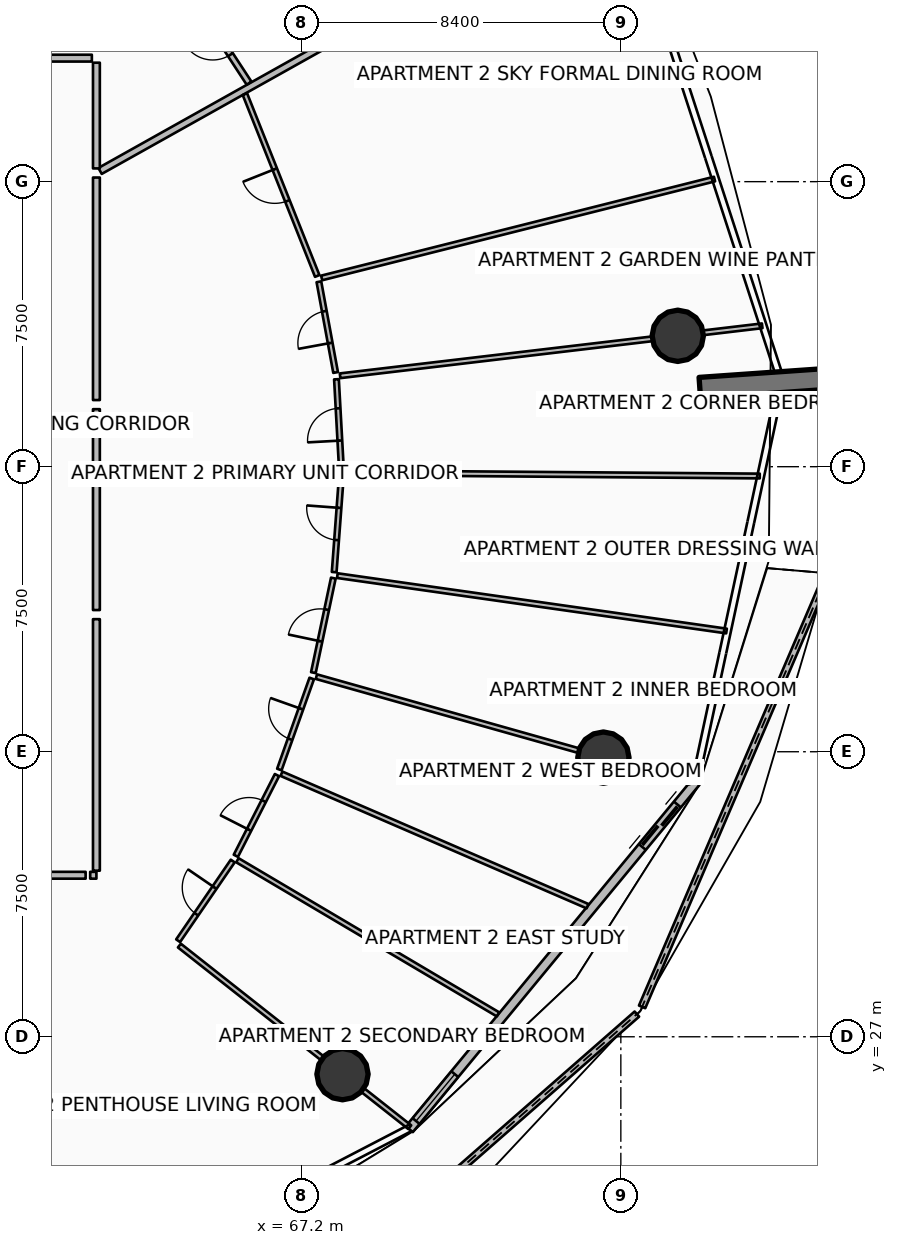
"""IFC4 building model, lengths in metres.
Left out: names, types, materials, properties, quantities, classifications, styles, units other than length and angle.
Written with IfcOpenShell. Run it as: python <this file> out.ifc"""

import sys

from ifc_helpers import new_model, si_unit, direction, frame, frame_2d, origin, origin_2d, place, context, subcontext, project, spatial, polyline, rectangle, circle, outline, extrude, element, fill, save


model = new_model("IFC4")
c1 = context("Model", 3, precision=1e-05, world=origin(), true_north=direction((0.0, 1.0)))
c2 = subcontext(c1, "Body", "Model", "MODEL_VIEW")
j1 = project(units=[si_unit("LENGTHUNIT", "METRE"), si_unit("PLANEANGLEUNIT", "RADIAN")], contexts=[c1])
p1 = place(None, origin())
s1 = spatial("IfcSite", under=j1, at=p1, CompositionType="ELEMENT")
p2 = place(p1, origin())
s2 = spatial("IfcBuilding", under=s1, at=p2, CompositionType="ELEMENT")
p3 = place(p2, frame((0.0, 0.0, 71.4)))
s3 = spatial("IfcBuildingStorey", under=s2, at=p3, CompositionType="ELEMENT", Elevation=71.4)
p4 = place(p3, frame((77.678, 44.075, 0.0), z_axis=(0.0, 0.0, 1.0), x_axis=(0.997564163539, 0.069754853754, 0.0)))
e1 = element("IfcWall", 1, at=p4, inside=s3, PredefinedType="SOLIDWALL", context=c2, shape_type="SweptSolid", body=[
    extrude(rectangle(XDim=3.5, YDim=0.55, at=frame_2d((1.75, 0.0))), origin(), (0.0, 0.0, 1.0), 3.75),
])
p5 = place(p3, frame((68.276, 26.016, 0.0), z_axis=(-0.320814220059, 0.252899785334, 0.912754038493), x_axis=(-0.619079225089, -0.785328538297, 0.0)))
e2 = element("IfcColumn", 2, at=p5, inside=s3, PredefinedType="COLUMN", context=c2, shape_type="SweptSolid", body=[
    extrude(circle(Radius=0.675, at=origin_2d()), origin(), (0.0, 0.0, 1.0), 3.67),
])
p6 = place(p3, frame((75.141, 34.345, 0.0), z_axis=(-0.422633852071, 0.119162449383, 0.898432489251), x_axis=(-0.271371626932, -0.962474643872, 0.0)))
e3 = element("IfcColumn", 3, at=p6, inside=s3, PredefinedType="COLUMN", context=c2, shape_type="SweptSolid", body=[
    extrude(circle(Radius=0.675, at=origin_2d()), origin(), (0.0, 0.0, 1.0), 3.729),
])
p7 = place(p3, frame((77.098, 45.444, 0.0), z_axis=(-0.449694478252, -0.053279796585, 0.8915919131), x_axis=(0.117657060398, -0.993054286602, 0.0)))
e4 = element("IfcColumn", 4, at=p7, inside=s3, PredefinedType="COLUMN", context=c2, shape_type="SweptSolid", body=[
    extrude(circle(Radius=0.675, at=origin_2d()), origin(), (0.0, 0.0, 1.0), 3.757),
])
p8 = place(p3, frame((67.163, 19.839, 0.0), z_axis=(0.0, 0.0, 1.0), x_axis=(0.752310783683, 0.658808382426, 0.0)))
e5 = element("IfcWall", 5, at=p8, inside=s3, PredefinedType="PARAPET", context=c2, shape_type="SweptSolid", body=[
    extrude(outline(polyline([(0.0, 0.0), (11.776, 0.0), (11.776, 1.348), (5.888, 1.562), (0.0, 1.747), (0.0, 0.0)])), frame((0.0, 0.09, 0.0), z_axis=(0.0, -1.0, 0.0), x_axis=(1.0, 0.0, 0.0)), (0.0, 0.0, 1.0), 0.18),
])
p9 = place(p3, frame((76.159, 27.786, 0.0), z_axis=(0.0, 0.0, 1.0), x_axis=(0.393762615554, 0.919212164079, 0.0)))
e6 = element("IfcWall", 6, at=p9, inside=s3, PredefinedType="PARAPET", context=c2, shape_type="SweptSolid", body=[
    extrude(outline(polyline([(0.0, 0.0), (12.412, 0.0), (12.412, 1.12), (6.206, 1.182), (0.0, 1.348), (0.0, 0.0)])), frame((0.0, 0.09, 0.0), z_axis=(0.0, -1.0, 0.0), x_axis=(1.0, 0.0, 0.0)), (0.0, 0.0, 1.0), 0.18),
])
p10 = place(p3, frame((70.033, 24.567, 0.0), z_axis=(0.0, 0.0, 1.0), x_axis=(0.636674332663, 0.771132799281, 0.0)))
e7 = element("IfcWall", 7, at=p10, inside=s3, PredefinedType="SOLIDWALL", context=c2, shape_type="SweptSolid", body=[
    extrude(rectangle(XDim=11.851, YDim=0.24, at=frame_2d((5.926, 0.0))), origin(), (0.0, 0.0, 1.0), 2.3),
])
p11 = place(p10, frame((9.631, 0.0, 0.0)))
e8 = element("IfcOpeningElement", 8, at=p11, cuts=e7, PredefinedType="OPENING", context=c2, shape_type="SweptSolid", body=[
    extrude(rectangle(XDim=1.45, YDim=2.15, at=frame_2d((0.725, 1.075))), frame((0.0, 0.13, 0.0), z_axis=(0.0, -1.0, 0.0), x_axis=(1.0, 0.0, 0.0)), (0.0, 0.0, 1.0), 0.26),
])
p12 = place(p10, frame((0.28, 0.0, 0.65)))
e9 = element("IfcOpeningElement", 9, at=p12, cuts=e7, PredefinedType="OPENING", context=c2, shape_type="SweptSolid", body=[
    extrude(rectangle(XDim=1.6, YDim=1.5, at=frame_2d((0.8, 0.75))), frame((0.0, 0.13, 0.0), z_axis=(0.0, -1.0, 0.0), x_axis=(1.0, 0.0, 0.0)), (0.0, 0.0, 1.0), 0.26),
])
p13 = place(p3, frame((61.896, 49.782, 0.0), z_axis=(0.0, 0.0, 1.0), x_axis=(0.872493215695, 0.488626225828, 0.0)))
e10 = element("IfcWall", 10, at=p13, inside=s3, PredefinedType="PARTITIONING", context=c2, shape_type="SweptSolid", body=[
    extrude(rectangle(XDim=15.612, YDim=0.18, at=frame_2d((7.806, 0.0))), origin(), (0.0, 0.0, 1.0), 2.307),
])
p14 = place(p3, frame((61.8, 49.848, 0.0), z_axis=(0.0, 0.0, 1.0), x_axis=(0.0, 1.0, 0.0)))
e11 = element("IfcWall", 11, at=p14, inside=s3, PredefinedType="PARTITIONING", context=c2, shape_type="SweptSolid", body=[
    extrude(rectangle(XDim=2.781, YDim=0.18, at=frame_2d((1.391, 0.0))), origin(), (0.0, 0.0, 1.0), 2.307),
])
p15 = place(p3, frame((61.68, 52.75, 0.0), z_axis=(0.0, 0.0, 1.0), x_axis=(-1.0, 0.0, 0.0)))
e12 = element("IfcWall", 12, at=p15, inside=s3, PredefinedType="PARTITIONING", context=c2, shape_type="SweptSolid", body=[
    extrude(rectangle(XDim=5.085, YDim=0.18, at=frame_2d((2.543, 0.0))), origin(), (0.0, 0.0, 1.0), 2.307),
])
p16 = place(p3, frame((65.816, 52.092, 0.0), z_axis=(0.0, 0.0, 1.0), x_axis=(-0.547635625156, 0.836716930664, 0.0)))
e13 = element("IfcWall", 13, at=p16, inside=s3, PredefinedType="PARTITIONING", context=c2, shape_type="SweptSolid", body=[
    extrude(rectangle(XDim=2.639, YDim=0.15, at=frame_2d((1.32, 0.0))), origin(), (0.0, 0.0, 1.0), 2.307),
])
p17 = place(p16, frame((0.895, 0.0, 0.0)))
e14 = element("IfcOpeningElement", 14, at=p17, cuts=e13, PredefinedType="OPENING", context=c2, shape_type="SweptSolid", body=[
    extrude(rectangle(XDim=0.85, YDim=2.06, at=frame_2d((0.425, 1.03))), frame((0.0, 0.085, 0.0), z_axis=(0.0, -1.0, 0.0), x_axis=(1.0, 0.0, 0.0)), (0.0, 0.0, 1.0), 0.17),
])
p18 = place(p3, frame((54.14, 31.25, 0.0), z_axis=(0.0, 0.0, 1.0), x_axis=(1.0, 0.0, 0.0)))
e15 = element("IfcWall", 15, at=p18, inside=s3, PredefinedType="PARTITIONING", context=c2, shape_type="SweptSolid", body=[
    extrude(rectangle(XDim=7.376, YDim=0.18, at=frame_2d((3.688, 0.0))), origin(), (0.0, 0.0, 1.0), 2.307),
])
p19 = place(p18, frame((3.138, 0.0, 0.0)))
e16 = element("IfcOpeningElement", 16, at=p19, cuts=e15, PredefinedType="OPENING", context=c2, shape_type="SweptSolid", body=[
    extrude(rectangle(XDim=1.1, YDim=2.1, at=frame_2d((0.55, 1.05))), frame((0.0, 0.1, 0.0), z_axis=(0.0, -1.0, 0.0), x_axis=(1.0, 0.0, 0.0)), (0.0, 0.0, 1.0), 0.2),
])
p20 = place(p3, frame((61.636, 31.25, 0.0), z_axis=(0.0, 0.0, 1.0), x_axis=(1.0, 0.0, 0.0)))
e17 = element("IfcWall", 17, at=p20, inside=s3, PredefinedType="PARTITIONING", context=c2, shape_type="SweptSolid", body=[
    extrude(rectangle(XDim=0.164, YDim=0.18, at=frame_2d((0.082, 0.0))), origin(), (0.0, 0.0, 1.0), 2.307),
])
p21 = place(p3, frame((61.8, 31.37, 0.0), z_axis=(0.0, 0.0, 1.0), x_axis=(0.0, 1.0, 0.0)))
e18 = element("IfcWall", 18, at=p21, inside=s3, PredefinedType="PARTITIONING", context=c2, shape_type="SweptSolid", body=[
    extrude(rectangle(XDim=6.618, YDim=0.18, at=frame_2d((3.309, 0.0))), origin(), (0.0, 0.0, 1.0), 2.307),
])
p22 = place(p3, frame((63.983, 29.4, 0.0), z_axis=(0.0, 0.0, 1.0), x_axis=(0.785322984339, -0.619086270457, 0.0)))
e19 = element("IfcWall", 19, at=p22, inside=s3, PredefinedType="PARTITIONING", context=c2, shape_type="SweptSolid", body=[
    extrude(rectangle(XDim=7.719, YDim=0.125, at=frame_2d((3.86, 0.0))), origin(), (0.0, 0.0, 1.0), 2.307),
])
p23 = place(p3, frame((65.51, 31.645, 0.0), z_axis=(0.0, 0.0, 1.0), x_axis=(0.86074163886, -0.509042072065, 0.0)))
e20 = element("IfcWall", 20, at=p23, inside=s3, PredefinedType="PARTITIONING", context=c2, shape_type="SweptSolid", body=[
    extrude(rectangle(XDim=7.968, YDim=0.125, at=frame_2d((3.984, 0.0))), origin(), (0.0, 0.0, 1.0), 2.325),
])
p24 = place(p3, frame((66.67, 33.921, 0.0), z_axis=(0.0, 0.0, 1.0), x_axis=(0.917747697885, -0.397163899451, 0.0)))
e21 = element("IfcWall", 21, at=p24, inside=s3, PredefinedType="PARTITIONING", context=c2, shape_type="SweptSolid", body=[
    extrude(rectangle(XDim=8.775, YDim=0.125, at=frame_2d((4.387, 0.0))), origin(), (0.0, 0.0, 1.0), 2.325),
])
p25 = place(p3, frame((63.95, 29.528, 0.0), z_axis=(0.0, 0.0, 1.0), x_axis=(0.565358509176, 0.824845292223, 0.0)))
e22 = element("IfcWall", 22, at=p25, inside=s3, PredefinedType="PARTITIONING", context=c2, shape_type="SweptSolid", body=[
    extrude(rectangle(XDim=2.542, YDim=0.125, at=frame_2d((1.271, 0.0))), origin(), (0.0, 0.0, 1.0), 2.307),
])
p26 = place(p25, frame((0.846, 0.0, 0.0)))
e23 = element("IfcOpeningElement", 23, at=p26, cuts=e22, PredefinedType="OPENING", context=c2, shape_type="SweptSolid", body=[
    extrude(rectangle(XDim=0.85, YDim=2.06, at=frame_2d((0.425, 1.03))), frame((0.0, 0.073, 0.0), z_axis=(0.0, -1.0, 0.0), x_axis=(1.0, 0.0, 0.0)), (0.0, 0.0, 1.0), 0.145),
])
p27 = place(p3, frame((65.469, 31.762, 0.0), z_axis=(0.0, 0.0, 1.0), x_axis=(0.45400250644, 0.891000406367, 0.0)))
e24 = element("IfcWall", 24, at=p27, inside=s3, PredefinedType="PARTITIONING", context=c2, shape_type="SweptSolid", body=[
    extrude(rectangle(XDim=2.383, YDim=0.125, at=frame_2d((1.192, 0.0))), origin(), (0.0, 0.0, 1.0), 2.79),
])
p28 = place(p27, frame((0.767, 0.0, 0.0)))
e25 = element("IfcOpeningElement", 25, at=p28, cuts=e24, PredefinedType="OPENING", context=c2, shape_type="SweptSolid", body=[
    extrude(rectangle(XDim=0.85, YDim=2.06, at=frame_2d((0.425, 1.03))), frame((0.0, 0.073, 0.0), z_axis=(0.0, -1.0, 0.0), x_axis=(1.0, 0.0, 0.0)), (0.0, 0.0, 1.0), 0.145),
])
p29 = place(p3, frame((66.614, 34.032, 0.0), z_axis=(0.0, 0.0, 1.0), x_axis=(0.335094930465, 0.942184370268, 0.0)))
e26 = element("IfcWall", 26, at=p29, inside=s3, PredefinedType="PARTITIONING", context=c2, shape_type="SweptSolid", body=[
    extrude(rectangle(XDim=2.542, YDim=0.125, at=frame_2d((1.271, 0.0))), origin(), (0.0, 0.0, 1.0), 2.307),
])
p30 = place(p29, frame((0.846, 0.0, 0.0)))
e27 = element("IfcOpeningElement", 27, at=p30, cuts=e26, PredefinedType="OPENING", context=c2, shape_type="SweptSolid", body=[
    extrude(rectangle(XDim=0.85, YDim=2.06, at=frame_2d((0.425, 1.03))), frame((0.0, 0.073, 0.0), z_axis=(0.0, -1.0, 0.0), x_axis=(1.0, 0.0, 0.0)), (0.0, 0.0, 1.0), 0.145),
])
p31 = place(p3, frame((61.8, 38.228, 0.0), z_axis=(0.0, 0.0, 1.0), x_axis=(0.0, 1.0, 0.0)))
e28 = element("IfcWall", 28, at=p31, inside=s3, PredefinedType="PARTITIONING", context=c2, shape_type="SweptSolid", body=[
    extrude(rectangle(XDim=5.285, YDim=0.18, at=frame_2d((2.643, 0.0))), origin(), (0.0, 0.0, 1.0), 2.307),
])
p32 = place(p3, frame((67.589, 36.475, 0.0), z_axis=(0.0, 0.0, 1.0), x_axis=(0.962457516126, -0.271432366627, 0.0)))
e29 = element("IfcWall", 29, at=p32, inside=s3, PredefinedType="PARTITIONING", context=c2, shape_type="SweptSolid", body=[
    extrude(rectangle(XDim=10.221, YDim=0.125, at=frame_2d((5.111, 0.0))), origin(), (0.0, 0.0, 1.0), 2.307),
])
p33 = place(p3, frame((68.14, 39.134, 0.0), z_axis=(0.0, 0.0, 1.0), x_axis=(0.990026759408, -0.140879436596, 0.0)))
e30 = element("IfcWall", 30, at=p33, inside=s3, PredefinedType="PARTITIONING", context=c2, shape_type="SweptSolid", body=[
    extrude(rectangle(XDim=10.344, YDim=0.125, at=frame_2d((5.172, 0.0))), origin(), (0.0, 0.0, 1.0), 2.325),
])
p34 = place(p3, frame((68.342, 41.84, 0.0), z_axis=(0.0, 0.0, 1.0), x_axis=(0.999969173113, -0.007851931271, 0.0)))
e31 = element("IfcWall", 31, at=p34, inside=s3, PredefinedType="PARTITIONING", context=c2, shape_type="SweptSolid", body=[
    extrude(rectangle(XDim=10.914, YDim=0.125, at=frame_2d((5.457, 0.0))), origin(), (0.0, 0.0, 1.0), 2.325),
])
p35 = place(p3, frame((67.509, 36.581, 0.0), z_axis=(0.0, 0.0, 1.0), x_axis=(0.206668673341, 0.978410986988, 0.0)))
e32 = element("IfcWall", 32, at=p35, inside=s3, PredefinedType="PARTITIONING", context=c2, shape_type="SweptSolid", body=[
    extrude(rectangle(XDim=2.542, YDim=0.125, at=frame_2d((1.271, 0.0))), origin(), (0.0, 0.0, 1.0), 2.307),
])
p36 = place(p35, frame((0.846, 0.0, 0.0)))
e33 = element("IfcOpeningElement", 33, at=p36, cuts=e32, PredefinedType="OPENING", context=c2, shape_type="SweptSolid", body=[
    extrude(rectangle(XDim=0.85, YDim=2.06, at=frame_2d((0.425, 1.03))), frame((0.0, 0.073, 0.0), z_axis=(0.0, -1.0, 0.0), x_axis=(1.0, 0.0, 0.0)), (0.0, 0.0, 1.0), 0.145),
])
p37 = place(p3, frame((68.057, 39.226, 0.0), z_axis=(0.0, 0.0, 1.0), x_axis=(0.074529691315, 0.997218795006, 0.0)))
e34 = element("IfcWall", 34, at=p37, inside=s3, PredefinedType="PARTITIONING", context=c2, shape_type="SweptSolid", body=[
    extrude(rectangle(XDim=2.542, YDim=0.125, at=frame_2d((1.271, 0.0))), origin(), (0.0, 0.0, 1.0), 2.79),
])
p38 = place(p37, frame((0.846, 0.0, 0.0)))
e35 = element("IfcOpeningElement", 35, at=p38, cuts=e34, PredefinedType="OPENING", context=c2, shape_type="SweptSolid", body=[
    extrude(rectangle(XDim=0.85, YDim=2.06, at=frame_2d((0.425, 1.03))), frame((0.0, 0.073, 0.0), z_axis=(0.0, -1.0, 0.0), x_axis=(1.0, 0.0, 0.0)), (0.0, 0.0, 1.0), 0.145),
])
p39 = place(p3, frame((68.248, 41.921, 0.0), z_axis=(0.0, 0.0, 1.0), x_axis=(-0.055010450721, 0.998485778723, 0.0)))
e36 = element("IfcWall", 36, at=p39, inside=s3, PredefinedType="PARTITIONING", context=c2, shape_type="SweptSolid", body=[
    extrude(rectangle(XDim=2.383, YDim=0.125, at=frame_2d((1.192, 0.0))), origin(), (0.0, 0.0, 1.0), 2.307),
])
p40 = place(p39, frame((0.767, 0.0, 0.0)))
e37 = element("IfcOpeningElement", 37, at=p40, cuts=e36, PredefinedType="OPENING", context=c2, shape_type="SweptSolid", body=[
    extrude(rectangle(XDim=0.85, YDim=2.06, at=frame_2d((0.425, 1.03))), frame((0.0, 0.073, 0.0), z_axis=(0.0, -1.0, 0.0), x_axis=(1.0, 0.0, 0.0)), (0.0, 0.0, 1.0), 0.145),
])
p41 = place(p3, frame((61.8, 43.753, 0.0), z_axis=(0.0, 0.0, 1.0), x_axis=(0.0, 1.0, 0.0)))
e38 = element("IfcWall", 38, at=p41, inside=s3, PredefinedType="PARTITIONING", context=c2, shape_type="SweptSolid", body=[
    extrude(rectangle(XDim=5.855, YDim=0.18, at=frame_2d((2.927, 0.0))), origin(), (0.0, 0.0, 1.0), 2.307),
])
p42 = place(p3, frame((68.212, 44.392, 0.0), z_axis=(0.0, 0.0, 1.0), x_axis=(0.993068868454, 0.117533920671, 0.0)))
e39 = element("IfcWall", 39, at=p42, inside=s3, PredefinedType="PARTITIONING", context=c2, shape_type="SweptSolid", body=[
    extrude(rectangle(XDim=11.186, YDim=0.125, at=frame_2d((5.593, 0.0))), origin(), (0.0, 0.0, 1.0), 2.307),
])
p43 = place(p3, frame((67.728, 46.966, 0.0), z_axis=(0.0, 0.0, 1.0), x_axis=(0.969745124893, 0.24411962794, 0.0)))
e40 = element("IfcWall", 40, at=p43, inside=s3, PredefinedType="PARTITIONING", context=c2, shape_type="SweptSolid", body=[
    extrude(rectangle(XDim=10.66, YDim=0.125, at=frame_2d((5.33, 0.0))), origin(), (0.0, 0.0, 1.0), 2.325),
])
p44 = place(p3, frame((68.094, 44.479, 0.0), z_axis=(0.0, 0.0, 1.0), x_axis=(-0.18117779211, 0.983450358506, 0.0)))
e41 = element("IfcWall", 41, at=p44, inside=s3, PredefinedType="PARTITIONING", context=c2, shape_type="SweptSolid", body=[
    extrude(rectangle(XDim=2.427, YDim=0.125, at=frame_2d((1.213, 0.0))), origin(), (0.0, 0.0, 1.0), 2.307),
])
p45 = place(p44, frame((0.788, 0.0, 0.0)))
e42 = element("IfcOpeningElement", 42, at=p45, cuts=e41, PredefinedType="OPENING", context=c2, shape_type="SweptSolid", body=[
    extrude(rectangle(XDim=0.85, YDim=2.06, at=frame_2d((0.425, 1.03))), frame((0.0, 0.073, 0.0), z_axis=(0.0, -1.0, 0.0), x_axis=(1.0, 0.0, 0.0)), (0.0, 0.0, 1.0), 0.145),
])
p46 = place(p3, frame((67.611, 47.019, 0.0), z_axis=(0.0, 0.0, 1.0), x_axis=(-0.36955872322, 0.929207377334, 0.0)))
e43 = element("IfcWall", 43, at=p46, inside=s3, PredefinedType="PARTITIONING", context=c2, shape_type="SweptSolid", body=[
    extrude(rectangle(XDim=5.149, YDim=0.125, at=frame_2d((2.574, 0.0))), origin(), (0.0, 0.0, 1.0), 2.307),
])
p47 = place(p46, frame((2.125, 0.0, 0.0)))
e44 = element("IfcOpeningElement", 44, at=p47, cuts=e43, PredefinedType="OPENING", context=c2, shape_type="SweptSolid", body=[
    extrude(rectangle(XDim=0.9, YDim=2.08, at=frame_2d((0.45, 1.04))), frame((0.0, 0.073, 0.0), z_axis=(0.0, -1.0, 0.0), x_axis=(1.0, 0.0, 0.0)), (0.0, 0.0, 1.0), 0.145),
])
p48 = place(p11, origin())
e45 = element("IfcDoor", 45, at=p48, inside=s3, OperationType="DOUBLE_DOOR_SLIDING", PredefinedType="DOOR", context=c2, shape_type="SweptSolid", body=[
    extrude(rectangle(XDim=1.45, YDim=2.15, at=frame_2d((0.725, 1.075))), frame((0.0, 0.025, 0.0), z_axis=(0.0, -1.0, 0.0), x_axis=(1.0, 0.0, 0.0)), (0.0, 0.0, 1.0), 0.05),
])
fill(e8, e45)
p49 = place(p12, origin())
e46 = element("IfcWindow", 46, at=p49, inside=s3, PartitioningType="SINGLE_PANEL", PredefinedType="WINDOW", context=c2, shape_type="SweptSolid", body=[
    extrude(rectangle(XDim=1.6, YDim=1.5, at=frame_2d((0.8, 0.75))), frame((0.0, 0.03, 0.0), z_axis=(0.0, -1.0, 0.0), x_axis=(1.0, 0.0, 0.0)), (0.0, 0.0, 1.0), 0.06),
])
fill(e9, e46)
p50 = place(p17, origin())
e47 = element("IfcDoor", 47, at=p50, inside=s3, OperationType="SINGLE_SWING_RIGHT", PredefinedType="DOOR", context=c2, shape_type="SweptSolid", body=[
    extrude(rectangle(XDim=0.85, YDim=2.06, at=frame_2d((0.425, 1.03))), frame((0.0, 0.025, 0.0), z_axis=(0.0, -1.0, 0.0), x_axis=(1.0, 0.0, 0.0)), (0.0, 0.0, 1.0), 0.05),
])
fill(e14, e47)
p51 = place(p26, origin())
e48 = element("IfcDoor", 48, at=p51, inside=s3, OperationType="SINGLE_SWING_RIGHT", PredefinedType="DOOR", context=c2, shape_type="SweptSolid", body=[
    extrude(rectangle(XDim=0.85, YDim=2.06, at=frame_2d((0.425, 1.03))), frame((0.0, 0.025, 0.0), z_axis=(0.0, -1.0, 0.0), x_axis=(1.0, 0.0, 0.0)), (0.0, 0.0, 1.0), 0.05),
])
fill(e23, e48)
p52 = place(p28, origin())
e49 = element("IfcDoor", 49, at=p52, inside=s3, OperationType="SINGLE_SWING_LEFT", PredefinedType="DOOR", context=c2, shape_type="SweptSolid", body=[
    extrude(rectangle(XDim=0.85, YDim=2.06, at=frame_2d((0.425, 1.03))), frame((0.0, 0.025, 0.0), z_axis=(0.0, -1.0, 0.0), x_axis=(1.0, 0.0, 0.0)), (0.0, 0.0, 1.0), 0.05),
])
fill(e25, e49)
p53 = place(p30, origin())
e50 = element("IfcDoor", 50, at=p53, inside=s3, OperationType="SINGLE_SWING_RIGHT", PredefinedType="DOOR", context=c2, shape_type="SweptSolid", body=[
    extrude(rectangle(XDim=0.85, YDim=2.06, at=frame_2d((0.425, 1.03))), frame((0.0, 0.025, 0.0), z_axis=(0.0, -1.0, 0.0), x_axis=(1.0, 0.0, 0.0)), (0.0, 0.0, 1.0), 0.05),
])
fill(e27, e50)
p54 = place(p36, origin())
e51 = element("IfcDoor", 51, at=p54, inside=s3, OperationType="SINGLE_SWING_LEFT", PredefinedType="DOOR", context=c2, shape_type="SweptSolid", body=[
    extrude(rectangle(XDim=0.85, YDim=2.06, at=frame_2d((0.425, 1.03))), frame((0.0, 0.025, 0.0), z_axis=(0.0, -1.0, 0.0), x_axis=(1.0, 0.0, 0.0)), (0.0, 0.0, 1.0), 0.05),
])
fill(e33, e51)
p55 = place(p38, origin())
e52 = element("IfcDoor", 52, at=p55, inside=s3, OperationType="SINGLE_SWING_RIGHT", PredefinedType="DOOR", context=c2, shape_type="SweptSolid", body=[
    extrude(rectangle(XDim=0.85, YDim=2.06, at=frame_2d((0.425, 1.03))), frame((0.0, 0.025, 0.0), z_axis=(0.0, -1.0, 0.0), x_axis=(1.0, 0.0, 0.0)), (0.0, 0.0, 1.0), 0.05),
])
fill(e35, e52)
p56 = place(p40, origin())
e53 = element("IfcDoor", 53, at=p56, inside=s3, OperationType="SINGLE_SWING_LEFT", PredefinedType="DOOR", context=c2, shape_type="SweptSolid", body=[
    extrude(rectangle(XDim=0.85, YDim=2.06, at=frame_2d((0.425, 1.03))), frame((0.0, 0.025, 0.0), z_axis=(0.0, -1.0, 0.0), x_axis=(1.0, 0.0, 0.0)), (0.0, 0.0, 1.0), 0.05),
])
fill(e37, e53)
p57 = place(p45, origin())
e54 = element("IfcDoor", 54, at=p57, inside=s3, OperationType="SINGLE_SWING_LEFT", PredefinedType="DOOR", context=c2, shape_type="SweptSolid", body=[
    extrude(rectangle(XDim=0.85, YDim=2.06, at=frame_2d((0.425, 1.03))), frame((0.0, 0.025, 0.0), z_axis=(0.0, -1.0, 0.0), x_axis=(1.0, 0.0, 0.0)), (0.0, 0.0, 1.0), 0.05),
])
fill(e42, e54)
p58 = place(p47, origin())
e55 = element("IfcDoor", 55, at=p58, inside=s3, OperationType="SINGLE_SWING_RIGHT", PredefinedType="DOOR", context=c2, shape_type="SweptSolid", body=[
    extrude(rectangle(XDim=0.9, YDim=2.08, at=frame_2d((0.45, 1.04))), frame((0.0, 0.025, 0.0), z_axis=(0.0, -1.0, 0.0), x_axis=(1.0, 0.0, 0.0)), (0.0, 0.0, 1.0), 0.05),
])
fill(e44, e55)
save(model, sys.argv[1])
